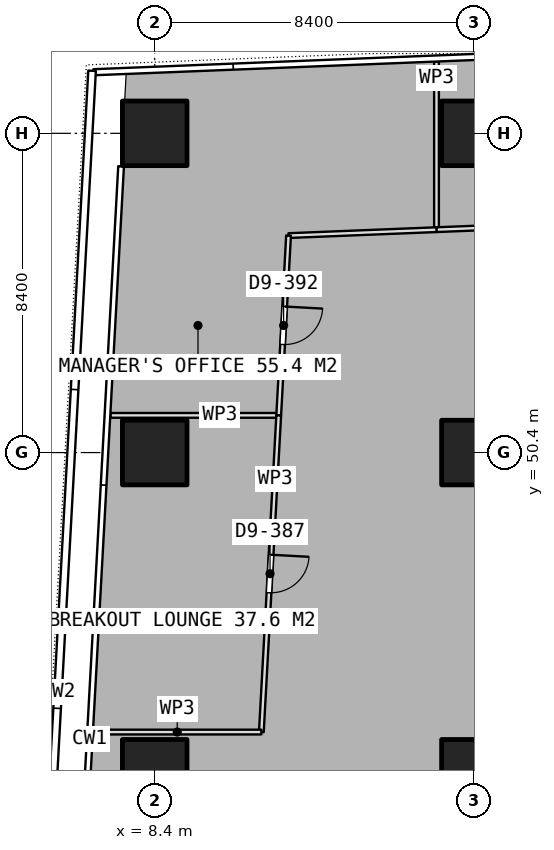
"""IFC4 building model, lengths in metres.
Left out: names, types, materials, properties, quantities, classifications, styles, units other than length and angle.
Written with IfcOpenShell. Run it as: python <this file> out.ifc"""

import sys

from ifc_helpers import new_model, si_unit, direction, frame, frame_2d, origin, origin_2d, place, context, subcontext, project, spatial, rectangle, extrude, element, fill, save


model = new_model("IFC4")
c1 = context("Model", 3, precision=1e-05, world=origin(), true_north=direction((0.0, 1.0)))
c2 = subcontext(c1, "Body", "Model", "MODEL_VIEW")
j1 = project(units=[si_unit("LENGTHUNIT", "METRE"), si_unit("PLANEANGLEUNIT", "RADIAN")], contexts=[c1])
p1 = place(None, origin())
s1 = spatial("IfcSite", under=j1, at=p1, CompositionType="ELEMENT")
p2 = place(p1, origin())
s2 = spatial("IfcBuilding", under=s1, at=p2, CompositionType="ELEMENT")
p3 = place(p2, frame((0.0, 0.0, 110.3)))
s3 = spatial("IfcBuildingStorey", under=s2, at=p3, CompositionType="ELEMENT", Elevation=110.3)
for number, where, z_axis, x_axis in (
    (1, (8.4, 42.0, 0.0), (0.0, 0.0, 1.0), (1.0, 0.0, 0.0)),
    (2, (8.4, 50.4, 0.0), (0.0, 0.0, 1.0), (1.0, 0.0, 0.0)),
    (3, (8.4, 58.8, 0.0), (0.0, 0.0, 1.0), (1.0, 0.0, 0.0)),
    (4, (16.8, 42.0, 0.0), (0.0, 0.0, 1.0), (1.0, 0.0, 0.0)),
    (5, (16.8, 50.4, 0.0), (0.0, 0.0, 1.0), (1.0, 0.0, 0.0)),
    (6, (16.8, 58.8, 0.0), (0.0, 0.0, 1.0), (1.0, 0.0, 0.0)),
):
    element("IfcColumn", number, at=place(p3, frame(where, z_axis=z_axis, x_axis=x_axis)), inside=s3, PredefinedType="COLUMN", context=c2, shape_type="SweptSolid", body=[
        extrude(rectangle(XDim=1.7, YDim=1.7, at=origin_2d()), origin(), (0.0, 0.0, 1.0), 3.75),
    ])
p4 = place(p3, frame((15.815, 56.265, 0.0), z_axis=(0.0, 0.0, 1.0), x_axis=(0.0, 1.0, 0.0)))
e7 = element("IfcWall", 7, at=p4, inside=s3, PredefinedType="PARTITIONING", context=c2, shape_type="SweptSolid", body=[
    extrude(rectangle(XDim=4.424, YDim=0.125, at=frame_2d((2.212, 0.0))), origin(), (0.0, 0.0, 1.0), 3.5),
])
p5 = place(p3, frame((25.413, 56.65, 0.0), z_axis=(0.0, 0.0, 1.0), x_axis=(-0.999196445736, -0.040080703946, 0.0)))
e8 = element("IfcWall", 8, at=p5, inside=s3, PredefinedType="PARTITIONING", context=c2, shape_type="SweptSolid", body=[
    extrude(rectangle(XDim=9.606, YDim=0.125, at=frame_2d((4.803, 0.0))), origin(), (0.0, 0.0, 1.0), 3.5),
])
p6 = place(p5, frame((4.303, 0.0, 0.0)))
e9 = element("IfcOpeningElement", 9, at=p6, cuts=e8, PredefinedType="OPENING", context=c2, shape_type="SweptSolid", body=[
    extrude(rectangle(XDim=1.0, YDim=2.1, at=frame_2d((0.5, 1.05))), frame((0.0, 0.073, 0.0), z_axis=(0.0, -1.0, 0.0), x_axis=(1.0, 0.0, 0.0)), (0.0, 0.0, 1.0), 0.145),
])
p7 = place(p3, frame((11.663, 51.379, 0.0), z_axis=(0.0, 0.0, 1.0), x_axis=(-1.0, 0.0, 0.0)))
e10 = element("IfcWall", 10, at=p7, inside=s3, PredefinedType="PARTITIONING", context=c2, shape_type="SweptSolid", body=[
    extrude(rectangle(XDim=4.427, YDim=0.125, at=frame_2d((2.213, 0.0))), origin(), (0.0, 0.0, 1.0), 3.5),
])
p8 = place(p3, frame((15.814, 56.265, 0.0), z_axis=(0.0, 0.0, 1.0), x_axis=(-0.999197550699, -0.040053148165, 0.0)))
e11 = element("IfcWall", 11, at=p8, inside=s3, PredefinedType="PARTITIONING", context=c2, shape_type="SweptSolid", body=[
    extrude(rectangle(XDim=3.895, YDim=0.125, at=frame_2d((1.948, 0.0))), origin(), (0.0, 0.0, 1.0), 3.5),
])
p9 = place(p3, frame((11.922, 56.109, 0.0), z_axis=(0.0, 0.0, 1.0), x_axis=(-0.054682179352, -0.998503810339, 0.0)))
e12 = element("IfcWall", 12, at=p9, inside=s3, PredefinedType="PARTITIONING", context=c2, shape_type="SweptSolid", body=[
    extrude(rectangle(XDim=4.737, YDim=0.125, at=frame_2d((2.369, 0.0))), origin(), (0.0, 0.0, 1.0), 3.5),
])
p10 = place(p9, frame((1.869, 0.0, 0.0)))
e13 = element("IfcOpeningElement", 13, at=p10, cuts=e12, PredefinedType="OPENING", context=c2, shape_type="SweptSolid", body=[
    extrude(rectangle(XDim=1.0, YDim=2.1, at=frame_2d((0.5, 1.05))), frame((0.0, 0.073, 0.0), z_axis=(0.0, -1.0, 0.0), x_axis=(1.0, 0.0, 0.0)), (0.0, 0.0, 1.0), 0.145),
])
p11 = place(p3, frame((11.663, 51.378, 0.0), z_axis=(0.0, 0.0, 1.0), x_axis=(-0.054769987218, -0.998498997746, 0.0)))
e14 = element("IfcWall", 14, at=p11, inside=s3, PredefinedType="PARTITIONING", context=c2, shape_type="SweptSolid", body=[
    extrude(rectangle(XDim=8.344, YDim=0.125, at=frame_2d((4.172, 0.0))), origin(), (0.0, 0.0, 1.0), 3.5),
])
p12 = place(p11, frame((3.672, 0.0, 0.0)))
e15 = element("IfcOpeningElement", 15, at=p12, cuts=e14, PredefinedType="OPENING", context=c2, shape_type="SweptSolid", body=[
    extrude(rectangle(XDim=1.0, YDim=2.1, at=frame_2d((0.5, 1.05))), frame((0.0, 0.073, 0.0), z_axis=(0.0, -1.0, 0.0), x_axis=(1.0, 0.0, 0.0)), (0.0, 0.0, 1.0), 0.145),
])
p13 = place(p3, frame((11.206, 43.046, 0.0), z_axis=(0.0, 0.0, 1.0), x_axis=(-1.0, 0.0, 0.0)))
e16 = element("IfcWall", 16, at=p13, inside=s3, PredefinedType="PARTITIONING", context=c2, shape_type="SweptSolid", body=[
    extrude(rectangle(XDim=4.427, YDim=0.125, at=frame_2d((2.213, 0.0))), origin(), (0.0, 0.0, 1.0), 3.5),
])
p14 = place(p10, origin())
e17 = element("IfcDoor", 17, at=p14, inside=s3, OperationType="SINGLE_SWING_LEFT", PredefinedType="DOOR", context=c2, shape_type="SweptSolid", body=[
    extrude(rectangle(XDim=1.0, YDim=2.1, at=frame_2d((0.5, 1.05))), frame((0.0, 0.025, 0.0), z_axis=(0.0, -1.0, 0.0), x_axis=(1.0, 0.0, 0.0)), (0.0, 0.0, 1.0), 0.05),
])
fill(e13, e17)
p15 = place(p12, origin())
e18 = element("IfcDoor", 18, at=p15, inside=s3, OperationType="SINGLE_SWING_LEFT", PredefinedType="DOOR", context=c2, shape_type="SweptSolid", body=[
    extrude(rectangle(XDim=1.0, YDim=2.1, at=frame_2d((0.5, 1.05))), frame((0.0, 0.025, 0.0), z_axis=(0.0, -1.0, 0.0), x_axis=(1.0, 0.0, 0.0)), (0.0, 0.0, 1.0), 0.05),
])
fill(e15, e18)
save(model, sys.argv[1])
